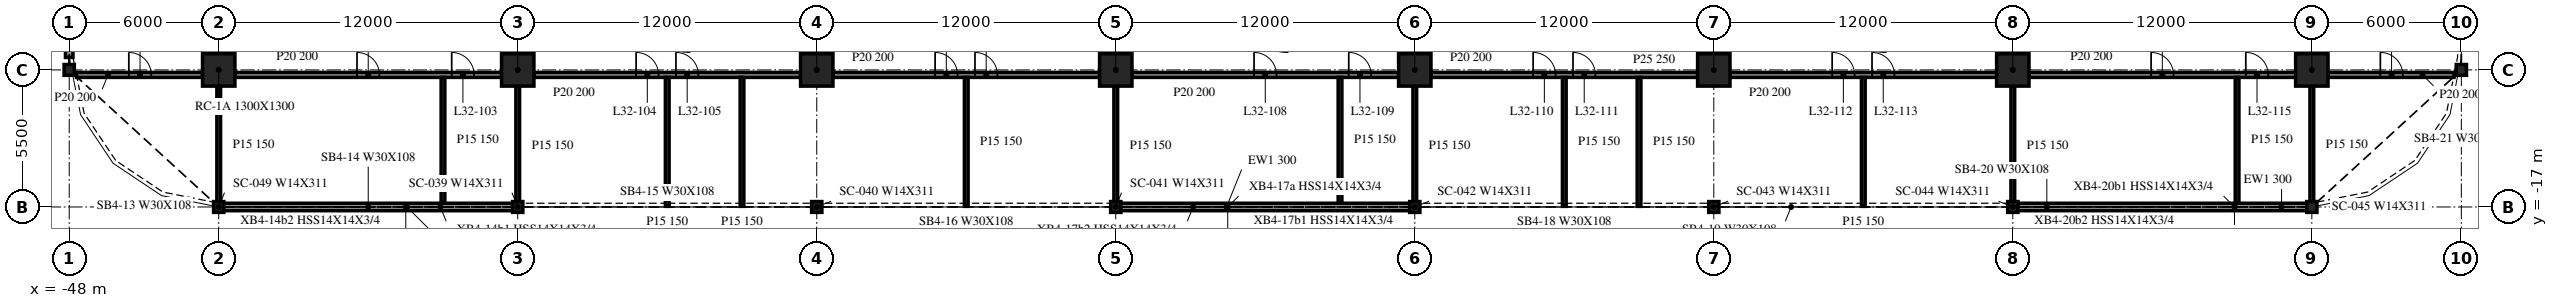
"""IFC4 building model, lengths in metres.
Left out: names, types, materials, properties, quantities, classifications, styles, units other than length and angle.
Written with IfcOpenShell. Run it as: python <this file> out.ifc"""

import sys

from ifc_helpers import new_model, si_unit, direction, frame, frame_2d, origin, origin_2d, place, context, subcontext, project, spatial, rectangle, i_section, extrude, element, fill, save


model = new_model("IFC4")
c1 = context("Model", 3, precision=1e-05, world=origin(), true_north=direction((0.0, 1.0)))
c2 = subcontext(c1, "Body", "Model", "MODEL_VIEW")
j1 = project(units=[si_unit("LENGTHUNIT", "METRE"), si_unit("PLANEANGLEUNIT", "RADIAN")], contexts=[c1])
p1 = place(None, origin())
s1 = spatial("IfcSite", under=j1, at=p1, CompositionType="ELEMENT")
p2 = place(p1, origin())
s2 = spatial("IfcBuilding", under=s1, at=p2, CompositionType="ELEMENT")
p3 = place(p2, frame((0.0, 0.0, 138.4)))
s3 = spatial("IfcBuildingStorey", under=s2, at=p3, CompositionType="ELEMENT", Elevation=138.4)
for number, where, z_axis, x_axis in (
    (1, (-42.0, -11.5, -0.34), (0.0, 0.0, 1.0), (1.0, 0.0, 0.0)),
    (2, (-30.0, -11.5, -0.34), (0.0, 0.0, 1.0), (1.0, 0.0, 0.0)),
    (3, (-18.0, -11.5, -0.34), (0.0, 0.0, 1.0), (1.0, 0.0, 0.0)),
    (4, (-6.0, -11.5, -0.34), (0.0, 0.0, 1.0), (1.0, 0.0, 0.0)),
    (5, (6.0, -11.5, -0.34), (0.0, 0.0, 1.0), (1.0, 0.0, 0.0)),
    (6, (18.0, -11.5, -0.34), (0.0, 0.0, 1.0), (1.0, 0.0, 0.0)),
    (7, (30.0, -11.5, -0.34), (0.0, 0.0, 1.0), (1.0, 0.0, 0.0)),
    (8, (42.0, -11.5, -0.34), (0.0, 0.0, 1.0), (1.0, 0.0, 0.0)),
):
    element("IfcColumn", number, at=place(p3, frame(where, z_axis=z_axis, x_axis=x_axis)), inside=s3, PredefinedType="COLUMN", context=c2, shape_type="SweptSolid", body=[
        extrude(rectangle(XDim=1.3, YDim=1.3, at=origin_2d()), origin(), (0.0, 0.0, 1.0), 4.1),
    ])
for number, where, z_axis, x_axis in (
    (9, (-48.0, -11.5, -0.34), (0.0, 0.0, 1.0), (1.0, 0.0, 0.0)),
    (10, (-42.0, -17.0, -0.34), (0.0, 0.0, 1.0), (1.0, 0.0, 0.0)),
    (11, (-30.0, -17.0, -0.34), (0.0, 0.0, 1.0), (1.0, 0.0, 0.0)),
    (12, (-18.0, -17.0, -0.34), (0.0, 0.0, 1.0), (1.0, 0.0, 0.0)),
    (13, (-6.0, -17.0, -0.34), (0.0, 0.0, 1.0), (1.0, 0.0, 0.0)),
    (14, (6.0, -17.0, -0.34), (0.0, 0.0, 1.0), (1.0, 0.0, 0.0)),
    (15, (18.0, -17.0, -0.34), (0.0, 0.0, 1.0), (1.0, 0.0, 0.0)),
    (16, (30.0, -17.0, -0.34), (0.0, 0.0, 1.0), (1.0, 0.0, 0.0)),
    (17, (42.0, -17.0, -0.34), (0.0, 0.0, 1.0), (1.0, 0.0, 0.0)),
    (18, (48.0, -11.5, -0.34), (0.0, 0.0, 1.0), (1.0, 0.0, 0.0)),
):
    element("IfcColumn", number, at=place(p3, frame(where, z_axis=z_axis, x_axis=x_axis)), inside=s3, PredefinedType="COLUMN", context=c2, shape_type="SweptSolid", body=[
        extrude(i_section(OverallWidth=0.412, OverallDepth=0.434, WebThickness=0.036, FlangeThickness=0.057, at=origin_2d()), origin(), (0.0, 0.0, 1.0), 4.1),
    ])
p4 = place(p3, frame((-48.0, -0.218, 0.0), z_axis=(0.0, 0.0, 1.0), x_axis=(0.0, -1.0, 0.0)))
e19 = element("IfcWall", 19, at=p4, inside=s3, PredefinedType="NOTDEFINED", context=c2, shape_type="SweptSolid", body=[
    extrude(rectangle(XDim=10.782, YDim=0.3, at=frame_2d((5.391, 0.0))), origin(), (0.0, 0.0, 1.0), 3.003),
])
for number, where, z_axis, x_axis in (
    (20, (-41.982, -17.0, 0.0), (0.0, 0.0, 1.0), (1.0, 0.0, 0.0)),
    (21, (-5.982, -17.0, 0.0), (0.0, 0.0, 1.0), (1.0, 0.0, 0.0)),
    (22, (30.018, -17.0, 0.0), (0.0, 0.0, 1.0), (1.0, 0.0, 0.0)),
):
    element("IfcWall", number, at=place(p3, frame(where, z_axis=z_axis, x_axis=x_axis)), inside=s3, PredefinedType="NOTDEFINED", context=c2, shape_type="SweptSolid", body=[
        extrude(rectangle(XDim=11.964, YDim=0.3, at=frame_2d((5.982, 0.0))), origin(), (0.0, 0.0, 1.0), 3.003),
    ])
p5 = place(p3, frame((-47.708, -11.7, 0.0), z_axis=(0.0, 0.0, 1.0), x_axis=(1.0, 0.0, 0.0)))
e23 = element("IfcWall", 23, at=p5, inside=s3, PredefinedType="PARTITIONING", context=c2, shape_type="SweptSolid", body=[
    extrude(rectangle(XDim=5.058, YDim=0.2, at=frame_2d((2.529, 0.0))), origin(), (0.0, 0.0, 1.0), 3.76),
])
p6 = place(p5, frame((2.1, 0.0, 0.0)))
e24 = element("IfcOpeningElement", 24, at=p6, cuts=e23, PredefinedType="OPENING", context=c2, shape_type="SweptSolid", body=[
    extrude(rectangle(XDim=0.9, YDim=2.1, at=frame_2d((0.45, 1.05))), frame((0.0, 0.11, 0.0), z_axis=(0.0, -1.0, 0.0), x_axis=(1.0, 0.0, 0.0)), (0.0, 0.0, 1.0), 0.22),
])
p7 = place(p3, frame((-41.35, -11.7, 0.0), z_axis=(0.0, 0.0, 1.0), x_axis=(1.0, 0.0, 0.0)))
e25 = element("IfcWall", 25, at=p7, inside=s3, PredefinedType="PARTITIONING", context=c2, shape_type="SweptSolid", body=[
    extrude(rectangle(XDim=10.7, YDim=0.2, at=frame_2d((5.35, 0.0))), origin(), (0.0, 0.0, 1.0), 3.76),
])
p8 = place(p7, frame((4.9, 0.0, 0.0)))
e26 = element("IfcOpeningElement", 26, at=p8, cuts=e25, PredefinedType="OPENING", context=c2, shape_type="SweptSolid", body=[
    extrude(rectangle(XDim=0.9, YDim=2.1, at=frame_2d((0.45, 1.05))), frame((0.0, 0.11, 0.0), z_axis=(0.0, -1.0, 0.0), x_axis=(1.0, 0.0, 0.0)), (0.0, 0.0, 1.0), 0.22),
])
p9 = place(p7, frame((8.7, 0.0, 0.0)))
e27 = element("IfcOpeningElement", 27, at=p9, cuts=e25, PredefinedType="OPENING", context=c2, shape_type="SweptSolid", body=[
    extrude(rectangle(XDim=0.9, YDim=2.1, at=frame_2d((0.45, 1.05))), frame((0.0, 0.11, 0.0), z_axis=(0.0, -1.0, 0.0), x_axis=(1.0, 0.0, 0.0)), (0.0, 0.0, 1.0), 0.22),
])
p10 = place(p3, frame((-29.35, -11.7, 0.0), z_axis=(0.0, 0.0, 1.0), x_axis=(1.0, 0.0, 0.0)))
e28 = element("IfcWall", 28, at=p10, inside=s3, PredefinedType="PARTITIONING", context=c2, shape_type="SweptSolid", body=[
    extrude(rectangle(XDim=10.7, YDim=0.2, at=frame_2d((5.35, 0.0))), origin(), (0.0, 0.0, 1.0), 3.76),
])
p11 = place(p10, frame((4.1, 0.0, 0.0)))
e29 = element("IfcOpeningElement", 29, at=p11, cuts=e28, PredefinedType="OPENING", context=c2, shape_type="SweptSolid", body=[
    extrude(rectangle(XDim=0.9, YDim=2.1, at=frame_2d((0.45, 1.05))), frame((0.0, 0.11, 0.0), z_axis=(0.0, -1.0, 0.0), x_axis=(1.0, 0.0, 0.0)), (0.0, 0.0, 1.0), 0.22),
])
p12 = place(p10, frame((5.7, 0.0, 0.0)))
e30 = element("IfcOpeningElement", 30, at=p12, cuts=e28, PredefinedType="OPENING", context=c2, shape_type="SweptSolid", body=[
    extrude(rectangle(XDim=0.9, YDim=2.1, at=frame_2d((0.45, 1.05))), frame((0.0, 0.11, 0.0), z_axis=(0.0, -1.0, 0.0), x_axis=(1.0, 0.0, 0.0)), (0.0, 0.0, 1.0), 0.22),
])
p13 = place(p3, frame((-17.35, -11.7, 0.0), z_axis=(0.0, 0.0, 1.0), x_axis=(1.0, 0.0, 0.0)))
e31 = element("IfcWall", 31, at=p13, inside=s3, PredefinedType="PARTITIONING", context=c2, shape_type="SweptSolid", body=[
    extrude(rectangle(XDim=10.7, YDim=0.2, at=frame_2d((5.35, 0.0))), origin(), (0.0, 0.0, 1.0), 3.76),
])
p14 = place(p13, frame((4.1, 0.0, 0.0)))
e32 = element("IfcOpeningElement", 32, at=p14, cuts=e31, PredefinedType="OPENING", context=c2, shape_type="SweptSolid", body=[
    extrude(rectangle(XDim=0.9, YDim=2.1, at=frame_2d((0.45, 1.05))), frame((0.0, 0.11, 0.0), z_axis=(0.0, -1.0, 0.0), x_axis=(1.0, 0.0, 0.0)), (0.0, 0.0, 1.0), 0.22),
])
p15 = place(p13, frame((5.7, 0.0, 0.0)))
e33 = element("IfcOpeningElement", 33, at=p15, cuts=e31, PredefinedType="OPENING", context=c2, shape_type="SweptSolid", body=[
    extrude(rectangle(XDim=0.9, YDim=2.1, at=frame_2d((0.45, 1.05))), frame((0.0, 0.11, 0.0), z_axis=(0.0, -1.0, 0.0), x_axis=(1.0, 0.0, 0.0)), (0.0, 0.0, 1.0), 0.22),
])
p16 = place(p3, frame((-5.35, -11.7, 0.0), z_axis=(0.0, 0.0, 1.0), x_axis=(1.0, 0.0, 0.0)))
e34 = element("IfcWall", 34, at=p16, inside=s3, PredefinedType="PARTITIONING", context=c2, shape_type="SweptSolid", body=[
    extrude(rectangle(XDim=10.7, YDim=0.2, at=frame_2d((5.35, 0.0))), origin(), (0.0, 0.0, 1.0), 3.76),
])
p17 = place(p16, frame((4.9, 0.0, 0.0)))
e35 = element("IfcOpeningElement", 35, at=p17, cuts=e34, PredefinedType="OPENING", context=c2, shape_type="SweptSolid", body=[
    extrude(rectangle(XDim=0.9, YDim=2.1, at=frame_2d((0.45, 1.05))), frame((0.0, 0.11, 0.0), z_axis=(0.0, -1.0, 0.0), x_axis=(1.0, 0.0, 0.0)), (0.0, 0.0, 1.0), 0.22),
])
p18 = place(p16, frame((8.7, 0.0, 0.0)))
e36 = element("IfcOpeningElement", 36, at=p18, cuts=e34, PredefinedType="OPENING", context=c2, shape_type="SweptSolid", body=[
    extrude(rectangle(XDim=0.9, YDim=2.1, at=frame_2d((0.45, 1.05))), frame((0.0, 0.11, 0.0), z_axis=(0.0, -1.0, 0.0), x_axis=(1.0, 0.0, 0.0)), (0.0, 0.0, 1.0), 0.22),
])
p19 = place(p3, frame((6.65, -11.7, 0.0), z_axis=(0.0, 0.0, 1.0), x_axis=(1.0, 0.0, 0.0)))
e37 = element("IfcWall", 37, at=p19, inside=s3, PredefinedType="PARTITIONING", context=c2, shape_type="SweptSolid", body=[
    extrude(rectangle(XDim=10.7, YDim=0.2, at=frame_2d((5.35, 0.0))), origin(), (0.0, 0.0, 1.0), 3.76),
])
p20 = place(p19, frame((4.1, 0.0, 0.0)))
e38 = element("IfcOpeningElement", 38, at=p20, cuts=e37, PredefinedType="OPENING", context=c2, shape_type="SweptSolid", body=[
    extrude(rectangle(XDim=0.9, YDim=2.1, at=frame_2d((0.45, 1.05))), frame((0.0, 0.11, 0.0), z_axis=(0.0, -1.0, 0.0), x_axis=(1.0, 0.0, 0.0)), (0.0, 0.0, 1.0), 0.22),
])
p21 = place(p19, frame((5.7, 0.0, 0.0)))
e39 = element("IfcOpeningElement", 39, at=p21, cuts=e37, PredefinedType="OPENING", context=c2, shape_type="SweptSolid", body=[
    extrude(rectangle(XDim=0.9, YDim=2.1, at=frame_2d((0.45, 1.05))), frame((0.0, 0.11, 0.0), z_axis=(0.0, -1.0, 0.0), x_axis=(1.0, 0.0, 0.0)), (0.0, 0.0, 1.0), 0.22),
])
p22 = place(p3, frame((18.65, -11.7, 0.0), z_axis=(0.0, 0.0, 1.0), x_axis=(1.0, 0.0, 0.0)))
e40 = element("IfcWall", 40, at=p22, inside=s3, PredefinedType="PARTITIONING", context=c2, shape_type="SweptSolid", body=[
    extrude(rectangle(XDim=10.7, YDim=0.2, at=frame_2d((5.35, 0.0))), origin(), (0.0, 0.0, 1.0), 3.76),
])
p23 = place(p22, frame((4.1, 0.0, 0.0)))
e41 = element("IfcOpeningElement", 41, at=p23, cuts=e40, PredefinedType="OPENING", context=c2, shape_type="SweptSolid", body=[
    extrude(rectangle(XDim=0.9, YDim=2.1, at=frame_2d((0.45, 1.05))), frame((0.0, 0.11, 0.0), z_axis=(0.0, -1.0, 0.0), x_axis=(1.0, 0.0, 0.0)), (0.0, 0.0, 1.0), 0.22),
])
p24 = place(p22, frame((5.7, 0.0, 0.0)))
e42 = element("IfcOpeningElement", 42, at=p24, cuts=e40, PredefinedType="OPENING", context=c2, shape_type="SweptSolid", body=[
    extrude(rectangle(XDim=0.9, YDim=2.1, at=frame_2d((0.45, 1.05))), frame((0.0, 0.11, 0.0), z_axis=(0.0, -1.0, 0.0), x_axis=(1.0, 0.0, 0.0)), (0.0, 0.0, 1.0), 0.22),
])
p25 = place(p3, frame((30.65, -11.7, 0.0), z_axis=(0.0, 0.0, 1.0), x_axis=(1.0, 0.0, 0.0)))
e43 = element("IfcWall", 43, at=p25, inside=s3, PredefinedType="PARTITIONING", context=c2, shape_type="SweptSolid", body=[
    extrude(rectangle(XDim=10.7, YDim=0.2, at=frame_2d((5.35, 0.0))), origin(), (0.0, 0.0, 1.0), 3.76),
])
p26 = place(p25, frame((4.9, 0.0, 0.0)))
e44 = element("IfcOpeningElement", 44, at=p26, cuts=e43, PredefinedType="OPENING", context=c2, shape_type="SweptSolid", body=[
    extrude(rectangle(XDim=0.9, YDim=2.1, at=frame_2d((0.45, 1.05))), frame((0.0, 0.11, 0.0), z_axis=(0.0, -1.0, 0.0), x_axis=(1.0, 0.0, 0.0)), (0.0, 0.0, 1.0), 0.22),
])
p27 = place(p25, frame((8.7, 0.0, 0.0)))
e45 = element("IfcOpeningElement", 45, at=p27, cuts=e43, PredefinedType="OPENING", context=c2, shape_type="SweptSolid", body=[
    extrude(rectangle(XDim=0.9, YDim=2.1, at=frame_2d((0.45, 1.05))), frame((0.0, 0.11, 0.0), z_axis=(0.0, -1.0, 0.0), x_axis=(1.0, 0.0, 0.0)), (0.0, 0.0, 1.0), 0.22),
])
p28 = place(p3, frame((42.65, -11.7, 0.0), z_axis=(0.0, 0.0, 1.0), x_axis=(1.0, 0.0, 0.0)))
e46 = element("IfcWall", 46, at=p28, inside=s3, PredefinedType="PARTITIONING", context=c2, shape_type="SweptSolid", body=[
    extrude(rectangle(XDim=5.058, YDim=0.2, at=frame_2d((2.529, 0.0))), origin(), (0.0, 0.0, 1.0), 3.76),
])
p29 = place(p28, frame((2.1, 0.0, 0.0)))
e47 = element("IfcOpeningElement", 47, at=p29, cuts=e46, PredefinedType="OPENING", context=c2, shape_type="SweptSolid", body=[
    extrude(rectangle(XDim=0.9, YDim=2.1, at=frame_2d((0.45, 1.05))), frame((0.0, 0.11, 0.0), z_axis=(0.0, -1.0, 0.0), x_axis=(1.0, 0.0, 0.0)), (0.0, 0.0, 1.0), 0.22),
])
p30 = place(p3, frame((-42.0, -16.847, 0.0), z_axis=(0.0, 0.0, 1.0), x_axis=(0.0, 1.0, 0.0)))
e48 = element("IfcWall", 48, at=p30, inside=s3, PredefinedType="PARTITIONING", context=c2, shape_type="SweptSolid", body=[
    extrude(rectangle(XDim=4.697, YDim=0.15, at=frame_2d((2.349, 0.0))), origin(), (0.0, 0.0, 1.0), 3.76),
])
p31 = place(p3, frame((-33.0, -16.85, 0.0), z_axis=(0.0, 0.0, 1.0), x_axis=(0.0, 1.0, 0.0)))
e49 = element("IfcWall", 49, at=p31, inside=s3, PredefinedType="PARTITIONING", context=c2, shape_type="SweptSolid", body=[
    extrude(rectangle(XDim=5.05, YDim=0.15, at=frame_2d((2.525, 0.0))), origin(), (0.0, 0.0, 1.0), 3.76),
])
p32 = place(p3, frame((-30.0, -16.975, 0.0), z_axis=(0.0, 0.0, 1.0), x_axis=(0.0, 1.0, 0.0)))
e50 = element("IfcWall", 50, at=p32, inside=s3, PredefinedType="PARTITIONING", context=c2, shape_type="SweptSolid", body=[
    extrude(rectangle(XDim=4.825, YDim=0.15, at=frame_2d((2.413, 0.0))), origin(), (0.0, 0.0, 1.0), 3.76),
])
for number, where, z_axis, x_axis in (
    (51, (-24.0, -16.975, 0.0), (0.0, 0.0, 1.0), (0.0, 1.0, 0.0)),
    (52, (-21.0, -16.975, 0.0), (0.0, 0.0, 1.0), (0.0, 1.0, 0.0)),
    (53, (-12.0, -16.975, 0.0), (0.0, 0.0, 1.0), (0.0, 1.0, 0.0)),
):
    element("IfcWall", number, at=place(p3, frame(where, z_axis=z_axis, x_axis=x_axis)), inside=s3, PredefinedType="PARTITIONING", context=c2, shape_type="SweptSolid", body=[
        extrude(rectangle(XDim=5.175, YDim=0.15, at=frame_2d((2.587, 0.0))), origin(), (0.0, 0.0, 1.0), 3.76),
    ])
p33 = place(p3, frame((-6.0, -16.975, 0.0), z_axis=(0.0, 0.0, 1.0), x_axis=(0.0, 1.0, 0.0)))
e54 = element("IfcWall", 54, at=p33, inside=s3, PredefinedType="PARTITIONING", context=c2, shape_type="SweptSolid", body=[
    extrude(rectangle(XDim=4.825, YDim=0.15, at=frame_2d((2.413, 0.0))), origin(), (0.0, 0.0, 1.0), 3.76),
])
p34 = place(p3, frame((3.0, -16.85, 0.0), z_axis=(0.0, 0.0, 1.0), x_axis=(0.0, 1.0, 0.0)))
e55 = element("IfcWall", 55, at=p34, inside=s3, PredefinedType="PARTITIONING", context=c2, shape_type="SweptSolid", body=[
    extrude(rectangle(XDim=5.05, YDim=0.15, at=frame_2d((2.525, 0.0))), origin(), (0.0, 0.0, 1.0), 3.76),
])
p35 = place(p3, frame((6.0, -16.975, 0.0), z_axis=(0.0, 0.0, 1.0), x_axis=(0.0, 1.0, 0.0)))
e56 = element("IfcWall", 56, at=p35, inside=s3, PredefinedType="PARTITIONING", context=c2, shape_type="SweptSolid", body=[
    extrude(rectangle(XDim=4.825, YDim=0.15, at=frame_2d((2.413, 0.0))), origin(), (0.0, 0.0, 1.0), 3.76),
])
for number, where, z_axis, x_axis in (
    (57, (12.0, -16.975, 0.0), (0.0, 0.0, 1.0), (0.0, 1.0, 0.0)),
    (58, (15.0, -16.975, 0.0), (0.0, 0.0, 1.0), (0.0, 1.0, 0.0)),
    (59, (24.0, -16.975, 0.0), (0.0, 0.0, 1.0), (0.0, 1.0, 0.0)),
):
    element("IfcWall", number, at=place(p3, frame(where, z_axis=z_axis, x_axis=x_axis)), inside=s3, PredefinedType="PARTITIONING", context=c2, shape_type="SweptSolid", body=[
        extrude(rectangle(XDim=5.175, YDim=0.15, at=frame_2d((2.587, 0.0))), origin(), (0.0, 0.0, 1.0), 3.76),
    ])
p36 = place(p3, frame((30.0, -16.975, 0.0), z_axis=(0.0, 0.0, 1.0), x_axis=(0.0, 1.0, 0.0)))
e60 = element("IfcWall", 60, at=p36, inside=s3, PredefinedType="PARTITIONING", context=c2, shape_type="SweptSolid", body=[
    extrude(rectangle(XDim=4.825, YDim=0.15, at=frame_2d((2.413, 0.0))), origin(), (0.0, 0.0, 1.0), 3.76),
])
p37 = place(p3, frame((39.0, -16.85, 0.0), z_axis=(0.0, 0.0, 1.0), x_axis=(0.0, 1.0, 0.0)))
e61 = element("IfcWall", 61, at=p37, inside=s3, PredefinedType="PARTITIONING", context=c2, shape_type="SweptSolid", body=[
    extrude(rectangle(XDim=5.05, YDim=0.15, at=frame_2d((2.525, 0.0))), origin(), (0.0, 0.0, 1.0), 3.76),
])
p38 = place(p3, frame((42.0, -16.847, 0.0), z_axis=(0.0, 0.0, 1.0), x_axis=(0.0, 1.0, 0.0)))
e62 = element("IfcWall", 62, at=p38, inside=s3, PredefinedType="PARTITIONING", context=c2, shape_type="SweptSolid", body=[
    extrude(rectangle(XDim=4.697, YDim=0.15, at=frame_2d((2.349, 0.0))), origin(), (0.0, 0.0, 1.0), 3.76),
])
p39 = place(p6, origin())
e63 = element("IfcDoor", 63, at=p39, inside=s3, OperationType="SINGLE_SWING_LEFT", PredefinedType="DOOR", context=c2, shape_type="SweptSolid", body=[
    extrude(rectangle(XDim=0.9, YDim=2.1, at=frame_2d((0.45, 1.05))), frame((0.0, 0.025, 0.0), z_axis=(0.0, -1.0, 0.0), x_axis=(1.0, 0.0, 0.0)), (0.0, 0.0, 1.0), 0.05),
])
fill(e24, e63)
p40 = place(p8, origin())
e64 = element("IfcDoor", 64, at=p40, inside=s3, OperationType="SINGLE_SWING_RIGHT", PredefinedType="DOOR", context=c2, shape_type="SweptSolid", body=[
    extrude(rectangle(XDim=0.9, YDim=2.1, at=frame_2d((0.45, 1.05))), frame((0.0, 0.025, 0.0), z_axis=(0.0, -1.0, 0.0), x_axis=(1.0, 0.0, 0.0)), (0.0, 0.0, 1.0), 0.05),
])
fill(e26, e64)
p41 = place(p9, origin())
e65 = element("IfcDoor", 65, at=p41, inside=s3, OperationType="SINGLE_SWING_LEFT", PredefinedType="DOOR", context=c2, shape_type="SweptSolid", body=[
    extrude(rectangle(XDim=0.9, YDim=2.1, at=frame_2d((0.45, 1.05))), frame((0.0, 0.025, 0.0), z_axis=(0.0, -1.0, 0.0), x_axis=(1.0, 0.0, 0.0)), (0.0, 0.0, 1.0), 0.05),
])
fill(e27, e65)
p42 = place(p11, origin())
e66 = element("IfcDoor", 66, at=p42, inside=s3, OperationType="SINGLE_SWING_RIGHT", PredefinedType="DOOR", context=c2, shape_type="SweptSolid", body=[
    extrude(rectangle(XDim=0.9, YDim=2.1, at=frame_2d((0.45, 1.05))), frame((0.0, 0.025, 0.0), z_axis=(0.0, -1.0, 0.0), x_axis=(1.0, 0.0, 0.0)), (0.0, 0.0, 1.0), 0.05),
])
fill(e29, e66)
p43 = place(p12, origin())
e67 = element("IfcDoor", 67, at=p43, inside=s3, OperationType="SINGLE_SWING_LEFT", PredefinedType="DOOR", context=c2, shape_type="SweptSolid", body=[
    extrude(rectangle(XDim=0.9, YDim=2.1, at=frame_2d((0.45, 1.05))), frame((0.0, 0.025, 0.0), z_axis=(0.0, -1.0, 0.0), x_axis=(1.0, 0.0, 0.0)), (0.0, 0.0, 1.0), 0.05),
])
fill(e30, e67)
p44 = place(p14, origin())
e68 = element("IfcDoor", 68, at=p44, inside=s3, OperationType="SINGLE_SWING_RIGHT", PredefinedType="DOOR", context=c2, shape_type="SweptSolid", body=[
    extrude(rectangle(XDim=0.9, YDim=2.1, at=frame_2d((0.45, 1.05))), frame((0.0, 0.025, 0.0), z_axis=(0.0, -1.0, 0.0), x_axis=(1.0, 0.0, 0.0)), (0.0, 0.0, 1.0), 0.05),
])
fill(e32, e68)
p45 = place(p15, origin())
e69 = element("IfcDoor", 69, at=p45, inside=s3, OperationType="SINGLE_SWING_LEFT", PredefinedType="DOOR", context=c2, shape_type="SweptSolid", body=[
    extrude(rectangle(XDim=0.9, YDim=2.1, at=frame_2d((0.45, 1.05))), frame((0.0, 0.025, 0.0), z_axis=(0.0, -1.0, 0.0), x_axis=(1.0, 0.0, 0.0)), (0.0, 0.0, 1.0), 0.05),
])
fill(e33, e69)
p46 = place(p17, origin())
e70 = element("IfcDoor", 70, at=p46, inside=s3, OperationType="SINGLE_SWING_LEFT", PredefinedType="DOOR", context=c2, shape_type="SweptSolid", body=[
    extrude(rectangle(XDim=0.9, YDim=2.1, at=frame_2d((0.45, 1.05))), frame((0.0, 0.025, 0.0), z_axis=(0.0, -1.0, 0.0), x_axis=(1.0, 0.0, 0.0)), (0.0, 0.0, 1.0), 0.05),
])
fill(e35, e70)
p47 = place(p18, origin())
e71 = element("IfcDoor", 71, at=p47, inside=s3, OperationType="SINGLE_SWING_LEFT", PredefinedType="DOOR", context=c2, shape_type="SweptSolid", body=[
    extrude(rectangle(XDim=0.9, YDim=2.1, at=frame_2d((0.45, 1.05))), frame((0.0, 0.025, 0.0), z_axis=(0.0, -1.0, 0.0), x_axis=(1.0, 0.0, 0.0)), (0.0, 0.0, 1.0), 0.05),
])
fill(e36, e71)
p48 = place(p20, origin())
e72 = element("IfcDoor", 72, at=p48, inside=s3, OperationType="SINGLE_SWING_RIGHT", PredefinedType="DOOR", context=c2, shape_type="SweptSolid", body=[
    extrude(rectangle(XDim=0.9, YDim=2.1, at=frame_2d((0.45, 1.05))), frame((0.0, 0.025, 0.0), z_axis=(0.0, -1.0, 0.0), x_axis=(1.0, 0.0, 0.0)), (0.0, 0.0, 1.0), 0.05),
])
fill(e38, e72)
p49 = place(p21, origin())
e73 = element("IfcDoor", 73, at=p49, inside=s3, OperationType="SINGLE_SWING_LEFT", PredefinedType="DOOR", context=c2, shape_type="SweptSolid", body=[
    extrude(rectangle(XDim=0.9, YDim=2.1, at=frame_2d((0.45, 1.05))), frame((0.0, 0.025, 0.0), z_axis=(0.0, -1.0, 0.0), x_axis=(1.0, 0.0, 0.0)), (0.0, 0.0, 1.0), 0.05),
])
fill(e39, e73)
p50 = place(p23, origin())
e74 = element("IfcDoor", 74, at=p50, inside=s3, OperationType="SINGLE_SWING_RIGHT", PredefinedType="DOOR", context=c2, shape_type="SweptSolid", body=[
    extrude(rectangle(XDim=0.9, YDim=2.1, at=frame_2d((0.45, 1.05))), frame((0.0, 0.025, 0.0), z_axis=(0.0, -1.0, 0.0), x_axis=(1.0, 0.0, 0.0)), (0.0, 0.0, 1.0), 0.05),
])
fill(e41, e74)
p51 = place(p24, origin())
e75 = element("IfcDoor", 75, at=p51, inside=s3, OperationType="SINGLE_SWING_LEFT", PredefinedType="DOOR", context=c2, shape_type="SweptSolid", body=[
    extrude(rectangle(XDim=0.9, YDim=2.1, at=frame_2d((0.45, 1.05))), frame((0.0, 0.025, 0.0), z_axis=(0.0, -1.0, 0.0), x_axis=(1.0, 0.0, 0.0)), (0.0, 0.0, 1.0), 0.05),
])
fill(e42, e75)
p52 = place(p26, origin())
e76 = element("IfcDoor", 76, at=p52, inside=s3, OperationType="SINGLE_SWING_RIGHT", PredefinedType="DOOR", context=c2, shape_type="SweptSolid", body=[
    extrude(rectangle(XDim=0.9, YDim=2.1, at=frame_2d((0.45, 1.05))), frame((0.0, 0.025, 0.0), z_axis=(0.0, -1.0, 0.0), x_axis=(1.0, 0.0, 0.0)), (0.0, 0.0, 1.0), 0.05),
])
fill(e44, e76)
p53 = place(p27, origin())
e77 = element("IfcDoor", 77, at=p53, inside=s3, OperationType="SINGLE_SWING_LEFT", PredefinedType="DOOR", context=c2, shape_type="SweptSolid", body=[
    extrude(rectangle(XDim=0.9, YDim=2.1, at=frame_2d((0.45, 1.05))), frame((0.0, 0.025, 0.0), z_axis=(0.0, -1.0, 0.0), x_axis=(1.0, 0.0, 0.0)), (0.0, 0.0, 1.0), 0.05),
])
fill(e45, e77)
p54 = place(p29, origin())
e78 = element("IfcDoor", 78, at=p54, inside=s3, OperationType="SINGLE_SWING_LEFT", PredefinedType="DOOR", context=c2, shape_type="SweptSolid", body=[
    extrude(rectangle(XDim=0.9, YDim=2.1, at=frame_2d((0.45, 1.05))), frame((0.0, 0.025, 0.0), z_axis=(0.0, -1.0, 0.0), x_axis=(1.0, 0.0, 0.0)), (0.0, 0.0, 1.0), 0.05),
])
fill(e47, e78)
save(model, sys.argv[1])
